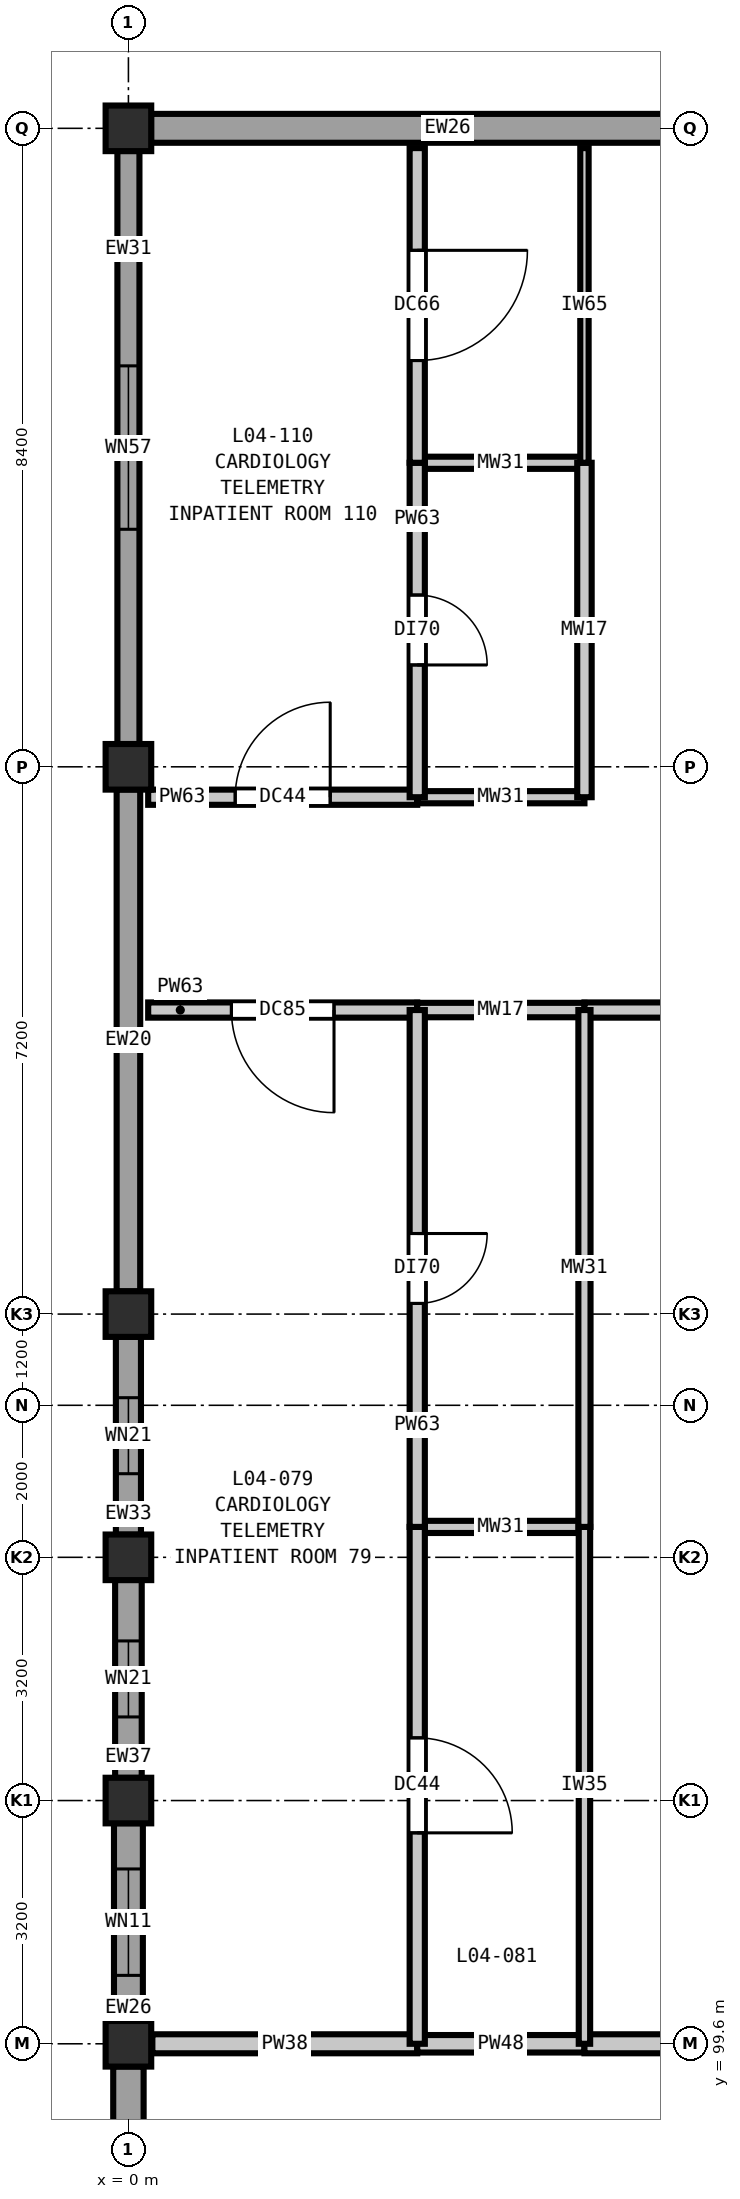
"""IFC4 building model, lengths in metres.
Left out: names, types, materials, properties, quantities, classifications, styles, units other than length and angle.
Written with IfcOpenShell. Run it as: python <this file> out.ifc"""

import sys

from ifc_helpers import new_model, si_unit, direction, frame, frame_2d, origin, origin_2d, place, context, subcontext, project, spatial, rectangle, extrude, element, fill, save


model = new_model("IFC4")
c1 = context("Model", 3, precision=1e-05, world=origin(), true_north=direction((0.0, 1.0)))
c2 = subcontext(c1, "Body", "Model", "MODEL_VIEW")
j1 = project(units=[si_unit("LENGTHUNIT", "METRE"), si_unit("PLANEANGLEUNIT", "RADIAN")], contexts=[c1])
p1 = place(None, origin())
s1 = spatial("IfcSite", under=j1, at=p1, CompositionType="ELEMENT")
p2 = place(p1, origin())
s2 = spatial("IfcBuilding", under=s1, at=p2, CompositionType="ELEMENT")
p3 = place(p2, frame((0.0, 0.0, 20.4)))
s3 = spatial("IfcBuildingStorey", under=s2, at=p3, CompositionType="ELEMENT", Elevation=20.4)
for number, where, z_axis, x_axis in (
    (1, (0.0, 99.6, 0.0), (0.0, 0.0, 1.0), (1.0, 0.0, 0.0)),
    (2, (0.0, 102.8, 0.0), (0.0, 0.0, 1.0), (1.0, 0.0, 0.0)),
    (3, (0.0, 106.0, 0.0), (0.0, 0.0, 1.0), (1.0, 0.0, 0.0)),
    (4, (0.0, 109.2, 0.0), (0.0, 0.0, 1.0), (1.0, 0.0, 0.0)),
    (5, (0.0, 116.4, 0.0), (0.0, 0.0, 1.0), (1.0, 0.0, 0.0)),
    (6, (0.0, 124.8, 0.0), (0.0, 0.0, 1.0), (1.0, 0.0, 0.0)),
):
    element("IfcColumn", number, at=place(p3, frame(where, z_axis=z_axis, x_axis=x_axis)), inside=s3, PredefinedType="COLUMN", context=c2, shape_type="SweptSolid", body=[
        extrude(rectangle(XDim=0.6, YDim=0.6, at=origin_2d()), origin(), (0.0, 0.0, 1.0), 4.2),
    ])
p4 = place(p3, frame((0.0, 91.498, 0.0), z_axis=(0.0, 0.0, 1.0), x_axis=(0.0, 1.0, 0.0)))
e7 = element("IfcWall", 7, at=p4, inside=s3, PredefinedType="SOLIDWALL", context=c2, shape_type="SweptSolid", body=[
    extrude(rectangle(XDim=7.804, YDim=0.4, at=frame_2d((3.902, 0.0))), origin(), (0.0, 0.0, 1.0), 3.48),
])
p5 = place(p4, frame((2.047, 0.0, 0.9)))
e8 = element("IfcOpeningElement", 8, at=p5, cuts=e7, PredefinedType="OPENING", context=c2, shape_type="SweptSolid", body=[
    extrude(rectangle(XDim=1.2, YDim=2.15, at=frame_2d((0.6, 1.075))), frame((0.0, 0.21, 0.0), z_axis=(0.0, -1.0, 0.0), x_axis=(1.0, 0.0, 0.0)), (0.0, 0.0, 1.0), 0.42),
])
p6 = place(p3, frame((0.0, 99.898, 0.0), z_axis=(0.0, 0.0, 1.0), x_axis=(0.0, 1.0, 0.0)))
e9 = element("IfcWall", 9, at=p6, inside=s3, PredefinedType="SOLIDWALL", context=c2, shape_type="SweptSolid", body=[
    extrude(rectangle(XDim=2.604, YDim=0.38, at=frame_2d((1.302, 0.0))), origin(), (0.0, 0.0, 1.0), 3.48),
])
p7 = place(p6, frame((0.602, 0.0, 0.9)))
e10 = element("IfcOpeningElement", 10, at=p7, cuts=e9, PredefinedType="OPENING", context=c2, shape_type="SweptSolid", body=[
    extrude(rectangle(XDim=1.4, YDim=2.15, at=frame_2d((0.7, 1.075))), frame((0.0, 0.2, 0.0), z_axis=(0.0, -1.0, 0.0), x_axis=(1.0, 0.0, 0.0)), (0.0, 0.0, 1.0), 0.4),
])
p8 = place(p3, frame((0.0, 103.098, 0.0), z_axis=(0.0, 0.0, 1.0), x_axis=(0.0, 1.0, 0.0)))
e11 = element("IfcWall", 11, at=p8, inside=s3, PredefinedType="SOLIDWALL", context=c2, shape_type="SweptSolid", body=[
    extrude(rectangle(XDim=2.604, YDim=0.35, at=frame_2d((1.302, 0.0))), origin(), (0.0, 0.0, 1.0), 3.48),
])
p9 = place(p8, frame((0.802, 0.0, 0.9)))
e12 = element("IfcOpeningElement", 12, at=p9, cuts=e11, PredefinedType="OPENING", context=c2, shape_type="SweptSolid", body=[
    extrude(rectangle(XDim=1.0, YDim=1.55, at=frame_2d((0.5, 0.775))), frame((0.0, 0.185, 0.0), z_axis=(0.0, -1.0, 0.0), x_axis=(1.0, 0.0, 0.0)), (0.0, 0.0, 1.0), 0.37),
])
p10 = place(p3, frame((0.0, 106.298, 0.0), z_axis=(0.0, 0.0, 1.0), x_axis=(0.0, 1.0, 0.0)))
e13 = element("IfcWall", 13, at=p10, inside=s3, PredefinedType="SOLIDWALL", context=c2, shape_type="SweptSolid", body=[
    extrude(rectangle(XDim=2.604, YDim=0.33, at=frame_2d((1.302, 0.0))), origin(), (0.0, 0.0, 1.0), 3.48),
])
p11 = place(p10, frame((0.802, 0.0, 0.9)))
e14 = element("IfcOpeningElement", 14, at=p11, cuts=e13, PredefinedType="OPENING", context=c2, shape_type="SweptSolid", body=[
    extrude(rectangle(XDim=1.0, YDim=1.55, at=frame_2d((0.5, 0.775))), frame((0.0, 0.175, 0.0), z_axis=(0.0, -1.0, 0.0), x_axis=(1.0, 0.0, 0.0)), (0.0, 0.0, 1.0), 0.35),
])
p12 = place(p3, frame((0.0, 109.498, 0.0), z_axis=(0.0, 0.0, 1.0), x_axis=(0.0, 1.0, 0.0)))
e15 = element("IfcWall", 15, at=p12, inside=s3, PredefinedType="SOLIDWALL", context=c2, shape_type="SweptSolid", body=[
    extrude(rectangle(XDim=6.604, YDim=0.31, at=frame_2d((3.302, 0.0))), origin(), (0.0, 0.0, 1.0), 3.48),
])
p13 = place(p3, frame((0.0, 116.698, 0.0), z_axis=(0.0, 0.0, 1.0), x_axis=(0.0, 1.0, 0.0)))
e16 = element("IfcWall", 16, at=p13, inside=s3, PredefinedType="SOLIDWALL", context=c2, shape_type="SweptSolid", body=[
    extrude(rectangle(XDim=7.804, YDim=0.29, at=frame_2d((3.902, 0.0))), origin(), (0.0, 0.0, 1.0), 3.48),
])
p14 = place(p13, frame((2.827, 0.0, 0.9)))
e17 = element("IfcOpeningElement", 17, at=p14, cuts=e16, PredefinedType="OPENING", context=c2, shape_type="SweptSolid", body=[
    extrude(rectangle(XDim=2.15, YDim=2.15, at=frame_2d((1.075, 1.075))), frame((0.0, 0.155, 0.0), z_axis=(0.0, -1.0, 0.0), x_axis=(1.0, 0.0, 0.0)), (0.0, 0.0, 1.0), 0.31),
])
p15 = place(p3, frame((0.298, 124.8, 0.0), z_axis=(0.0, 0.0, 1.0), x_axis=(1.0, 0.0, 0.0)))
e18 = element("IfcWall", 18, at=p15, inside=s3, PredefinedType="SOLIDWALL", context=c2, shape_type="SweptSolid", body=[
    extrude(rectangle(XDim=7.804, YDim=0.38, at=frame_2d((3.902, 0.0))), origin(), (0.0, 0.0, 1.0), 3.48),
])
p16 = place(p3, frame((0.315, 99.6, 0.0), z_axis=(0.0, 0.0, 1.0), x_axis=(1.0, 0.0, 0.0)))
e19 = element("IfcWall", 19, at=p16, inside=s3, PredefinedType="PARTITIONING", context=c2, shape_type="SweptSolid", body=[
    extrude(rectangle(XDim=3.485, YDim=0.25, at=frame_2d((1.743, 0.0))), origin(), (0.0, 0.0, 1.0), 3.585),
])
p17 = place(p3, frame((3.8, 99.6, 0.0), z_axis=(0.0, 0.0, 1.0), x_axis=(1.0, 0.0, 0.0)))
e20 = element("IfcWall", 20, at=p17, inside=s3, PredefinedType="PARTITIONING", context=c2, shape_type="SweptSolid", body=[
    extrude(rectangle(XDim=2.2, YDim=0.23, at=frame_2d((1.1, 0.0))), origin(), (0.0, 0.0, 1.0), 3.585),
])
p18 = place(p3, frame((6.0, 99.6, 0.0), z_axis=(0.0, 0.0, 1.0), x_axis=(1.0, 0.0, 0.0)))
e21 = element("IfcWall", 21, at=p18, inside=s3, PredefinedType="PARTITIONING", context=c2, shape_type="SweptSolid", body=[
    extrude(rectangle(XDim=2.085, YDim=0.25, at=frame_2d((1.042, 0.0))), origin(), (0.0, 0.0, 1.0), 3.585),
])
p19 = place(p3, frame((3.8, 106.4, 0.0), z_axis=(0.0, 0.0, 1.0), x_axis=(1.0, 0.0, 0.0)))
e22 = element("IfcWall", 22, at=p19, inside=s3, PredefinedType="PLUMBINGWALL", context=c2, shape_type="SweptSolid", body=[
    extrude(rectangle(XDim=2.2, YDim=0.16, at=frame_2d((1.1, 0.0))), origin(), (0.0, 0.0, 1.0), 3.82),
])
p20 = place(p3, frame((0.26, 113.2, 0.0), z_axis=(0.0, 0.0, 1.0), x_axis=(1.0, 0.0, 0.0)))
e23 = element("IfcWall", 23, at=p20, inside=s3, PredefinedType="PARTITIONING", context=c2, shape_type="SweptSolid", body=[
    extrude(rectangle(XDim=3.54, YDim=0.2, at=frame_2d((1.77, 0.0))), origin(), (0.0, 0.0, 1.0), 3.82),
])
p21 = place(p20, frame((1.095, 0.0, 0.0)))
e24 = element("IfcOpeningElement", 24, at=p21, cuts=e23, PredefinedType="OPENING", context=c2, shape_type="SweptSolid", body=[
    extrude(rectangle(XDim=1.35, YDim=2.2, at=frame_2d((0.675, 1.1))), frame((0.0, 0.11, 0.0), z_axis=(0.0, -1.0, 0.0), x_axis=(1.0, 0.0, 0.0)), (0.0, 0.0, 1.0), 0.22),
])
p22 = place(p3, frame((3.8, 113.2, 0.0), z_axis=(0.0, 0.0, 1.0), x_axis=(1.0, 0.0, 0.0)))
e25 = element("IfcWall", 25, at=p22, inside=s3, PredefinedType="PLUMBINGWALL", context=c2, shape_type="SweptSolid", body=[
    extrude(rectangle(XDim=2.2, YDim=0.19, at=frame_2d((1.1, 0.0))), origin(), (0.0, 0.0, 1.0), 3.82),
])
p23 = place(p3, frame((6.0, 113.2, 0.0), z_axis=(0.0, 0.0, 1.0), x_axis=(1.0, 0.0, 0.0)))
e26 = element("IfcWall", 26, at=p23, inside=s3, PredefinedType="PARTITIONING", context=c2, shape_type="SweptSolid", body=[
    extrude(rectangle(XDim=7.0, YDim=0.2, at=frame_2d((3.5, 0.0))), origin(), (0.0, 0.0, 1.0), 3.82),
])
p24 = place(p23, frame((2.775, 0.0, 0.0)))
e27 = element("IfcOpeningElement", 27, at=p24, cuts=e26, PredefinedType="OPENING", context=c2, shape_type="SweptSolid", body=[
    extrude(rectangle(XDim=1.45, YDim=2.25, at=frame_2d((0.725, 1.125))), frame((0.0, 0.11, 0.0), z_axis=(0.0, -1.0, 0.0), x_axis=(1.0, 0.0, 0.0)), (0.0, 0.0, 1.0), 0.22),
])
p25 = place(p3, frame((0.26, 116.0, 0.0), z_axis=(0.0, 0.0, 1.0), x_axis=(1.0, 0.0, 0.0)))
e28 = element("IfcWall", 28, at=p25, inside=s3, PredefinedType="PARTITIONING", context=c2, shape_type="SweptSolid", body=[
    extrude(rectangle(XDim=3.54, YDim=0.2, at=frame_2d((1.77, 0.0))), origin(), (0.0, 0.0, 1.0), 3.82),
])
p26 = place(p25, frame((1.145, 0.0, 0.0)))
e29 = element("IfcOpeningElement", 29, at=p26, cuts=e28, PredefinedType="OPENING", context=c2, shape_type="SweptSolid", body=[
    extrude(rectangle(XDim=1.25, YDim=2.15, at=frame_2d((0.625, 1.075))), frame((0.0, 0.11, 0.0), z_axis=(0.0, -1.0, 0.0), x_axis=(1.0, 0.0, 0.0)), (0.0, 0.0, 1.0), 0.22),
])
for number, where, z_axis, x_axis in (
    (30, (3.8, 116.0, 0.0), (0.0, 0.0, 1.0), (1.0, 0.0, 0.0)),
    (31, (3.8, 120.4, 0.0), (0.0, 0.0, 1.0), (1.0, 0.0, 0.0)),
):
    element("IfcWall", number, at=place(p3, frame(where, z_axis=z_axis, x_axis=x_axis)), inside=s3, PredefinedType="PLUMBINGWALL", context=c2, shape_type="SweptSolid", body=[
        extrude(rectangle(XDim=2.2, YDim=0.16, at=frame_2d((1.1, 0.0))), origin(), (0.0, 0.0, 1.0), 3.82),
    ])
p27 = place(p3, frame((3.8, 99.6, 0.0), z_axis=(0.0, 0.0, 1.0), x_axis=(0.0, 1.0, 0.0)))
e32 = element("IfcWall", 32, at=p27, inside=s3, PredefinedType="PARTITIONING", context=c2, shape_type="SweptSolid", body=[
    extrude(rectangle(XDim=6.8, YDim=0.2, at=frame_2d((3.4, 0.0))), origin(), (0.0, 0.0, 1.0), 3.82),
])
p28 = place(p27, frame((2.775, 0.0, 0.0)))
e33 = element("IfcOpeningElement", 33, at=p28, cuts=e32, PredefinedType="OPENING", context=c2, shape_type="SweptSolid", body=[
    extrude(rectangle(XDim=1.25, YDim=2.15, at=frame_2d((0.625, 1.075))), frame((0.0, 0.11, 0.0), z_axis=(0.0, -1.0, 0.0), x_axis=(1.0, 0.0, 0.0)), (0.0, 0.0, 1.0), 0.22),
])
p29 = place(p3, frame((3.8, 106.4, 0.0), z_axis=(0.0, 0.0, 1.0), x_axis=(0.0, 1.0, 0.0)))
e34 = element("IfcWall", 34, at=p29, inside=s3, PredefinedType="PARTITIONING", context=c2, shape_type="SweptSolid", body=[
    extrude(rectangle(XDim=6.8, YDim=0.2, at=frame_2d((3.4, 0.0))), origin(), (0.0, 0.0, 1.0), 3.82),
])
p30 = place(p29, frame((2.94, 0.0, 0.0)))
e35 = element("IfcOpeningElement", 35, at=p30, cuts=e34, PredefinedType="OPENING", context=c2, shape_type="SweptSolid", body=[
    extrude(rectangle(XDim=0.92, YDim=2.1, at=frame_2d((0.46, 1.05))), frame((0.0, 0.11, 0.0), z_axis=(0.0, -1.0, 0.0), x_axis=(1.0, 0.0, 0.0)), (0.0, 0.0, 1.0), 0.22),
])
p31 = place(p3, frame((3.8, 116.0, 0.0), z_axis=(0.0, 0.0, 1.0), x_axis=(0.0, 1.0, 0.0)))
e36 = element("IfcWall", 36, at=p31, inside=s3, PredefinedType="PARTITIONING", context=c2, shape_type="SweptSolid", body=[
    extrude(rectangle(XDim=4.4, YDim=0.2, at=frame_2d((2.2, 0.0))), origin(), (0.0, 0.0, 1.0), 3.82),
])
p32 = place(p31, frame((1.74, 0.0, 0.0)))
e37 = element("IfcOpeningElement", 37, at=p32, cuts=e36, PredefinedType="OPENING", context=c2, shape_type="SweptSolid", body=[
    extrude(rectangle(XDim=0.92, YDim=2.1, at=frame_2d((0.46, 1.05))), frame((0.0, 0.11, 0.0), z_axis=(0.0, -1.0, 0.0), x_axis=(1.0, 0.0, 0.0)), (0.0, 0.0, 1.0), 0.22),
])
p33 = place(p3, frame((3.8, 120.4, 0.0), z_axis=(0.0, 0.0, 1.0), x_axis=(0.0, 1.0, 0.0)))
e38 = element("IfcWall", 38, at=p33, inside=s3, PredefinedType="PARTITIONING", context=c2, shape_type="SweptSolid", body=[
    extrude(rectangle(XDim=4.14, YDim=0.2, at=frame_2d((2.07, 0.0))), origin(), (0.0, 0.0, 1.0), 3.82),
])
p34 = place(p33, frame((1.345, 0.0, 0.0)))
e39 = element("IfcOpeningElement", 39, at=p34, cuts=e38, PredefinedType="OPENING", context=c2, shape_type="SweptSolid", body=[
    extrude(rectangle(XDim=1.45, YDim=2.25, at=frame_2d((0.725, 1.125))), frame((0.0, 0.11, 0.0), z_axis=(0.0, -1.0, 0.0), x_axis=(1.0, 0.0, 0.0)), (0.0, 0.0, 1.0), 0.22),
])
p35 = place(p3, frame((6.0, 99.6, 0.0), z_axis=(0.0, 0.0, 1.0), x_axis=(0.0, 1.0, 0.0)))
e40 = element("IfcWall", 40, at=p35, inside=s3, PredefinedType="PARTITIONING", context=c2, shape_type="SweptSolid", body=[
    extrude(rectangle(XDim=6.8, YDim=0.15, at=frame_2d((3.4, 0.0))), origin(), (0.0, 0.0, 1.0), 3.82),
])
p36 = place(p3, frame((6.0, 106.4, 0.0), z_axis=(0.0, 0.0, 1.0), x_axis=(0.0, 1.0, 0.0)))
e41 = element("IfcWall", 41, at=p36, inside=s3, PredefinedType="PLUMBINGWALL", context=c2, shape_type="SweptSolid", body=[
    extrude(rectangle(XDim=6.8, YDim=0.16, at=frame_2d((3.4, 0.0))), origin(), (0.0, 0.0, 1.0), 3.82),
])
p37 = place(p3, frame((6.0, 116.0, 0.0), z_axis=(0.0, 0.0, 1.0), x_axis=(0.0, 1.0, 0.0)))
e42 = element("IfcWall", 42, at=p37, inside=s3, PredefinedType="PLUMBINGWALL", context=c2, shape_type="SweptSolid", body=[
    extrude(rectangle(XDim=4.4, YDim=0.19, at=frame_2d((2.2, 0.0))), origin(), (0.0, 0.0, 1.0), 3.82),
])
p38 = place(p3, frame((6.0, 120.4, 0.0), z_axis=(0.0, 0.0, 1.0), x_axis=(0.0, 1.0, 0.0)))
e43 = element("IfcWall", 43, at=p38, inside=s3, PredefinedType="PARTITIONING", context=c2, shape_type="SweptSolid", body=[
    extrude(rectangle(XDim=4.14, YDim=0.11, at=frame_2d((2.07, 0.0))), origin(), (0.0, 0.0, 1.0), 3.82),
])
p39 = place(p7, origin())
e44 = element("IfcWindow", 44, at=p39, inside=s3, PartitioningType="SINGLE_PANEL", PredefinedType="WINDOW", context=c2, shape_type="SweptSolid", body=[
    extrude(rectangle(XDim=1.4, YDim=2.15, at=frame_2d((0.7, 1.075))), frame((0.0, 0.03, 0.0), z_axis=(0.0, -1.0, 0.0), x_axis=(1.0, 0.0, 0.0)), (0.0, 0.0, 1.0), 0.06),
])
fill(e10, e44)
p40 = place(p9, origin())
e45 = element("IfcWindow", 45, at=p40, inside=s3, PartitioningType="SINGLE_PANEL", PredefinedType="WINDOW", context=c2, shape_type="SweptSolid", body=[
    extrude(rectangle(XDim=1.0, YDim=1.55, at=frame_2d((0.5, 0.775))), frame((0.0, 0.03, 0.0), z_axis=(0.0, -1.0, 0.0), x_axis=(1.0, 0.0, 0.0)), (0.0, 0.0, 1.0), 0.06),
])
fill(e12, e45)
p41 = place(p11, origin())
e46 = element("IfcWindow", 46, at=p41, inside=s3, PartitioningType="SINGLE_PANEL", PredefinedType="WINDOW", context=c2, shape_type="SweptSolid", body=[
    extrude(rectangle(XDim=1.0, YDim=1.55, at=frame_2d((0.5, 0.775))), frame((0.0, 0.03, 0.0), z_axis=(0.0, -1.0, 0.0), x_axis=(1.0, 0.0, 0.0)), (0.0, 0.0, 1.0), 0.06),
])
fill(e14, e46)
p42 = place(p14, origin())
e47 = element("IfcWindow", 47, at=p42, inside=s3, PartitioningType="DOUBLE_PANEL_VERTICAL", PredefinedType="WINDOW", context=c2, shape_type="SweptSolid", body=[
    extrude(rectangle(XDim=2.15, YDim=2.15, at=frame_2d((1.075, 1.075))), frame((0.0, 0.03, 0.0), z_axis=(0.0, -1.0, 0.0), x_axis=(1.0, 0.0, 0.0)), (0.0, 0.0, 1.0), 0.06),
])
fill(e17, e47)
p43 = place(p21, frame((1.35, 0.0, 0.0), z_axis=(0.0, 0.0, 1.0), x_axis=(-1.0, 0.0, 0.0)))
e48 = element("IfcDoor", 48, at=p43, inside=s3, OperationType="SINGLE_SWING_LEFT", PredefinedType="DOOR", context=c2, shape_type="SweptSolid", body=[
    extrude(rectangle(XDim=1.35, YDim=2.2, at=frame_2d((0.675, 1.1))), frame((0.0, 0.025, 0.0), z_axis=(0.0, -1.0, 0.0), x_axis=(1.0, 0.0, 0.0)), (0.0, 0.0, 1.0), 0.05),
])
fill(e24, e48)
p44 = place(p26, origin())
e49 = element("IfcDoor", 49, at=p44, inside=s3, OperationType="SINGLE_SWING_RIGHT", PredefinedType="DOOR", context=c2, shape_type="SweptSolid", body=[
    extrude(rectangle(XDim=1.25, YDim=2.15, at=frame_2d((0.625, 1.075))), frame((0.0, 0.025, 0.0), z_axis=(0.0, -1.0, 0.0), x_axis=(1.0, 0.0, 0.0)), (0.0, 0.0, 1.0), 0.05),
])
fill(e29, e49)
p45 = place(p28, frame((1.25, 0.0, 0.0), z_axis=(0.0, 0.0, 1.0), x_axis=(-1.0, 0.0, 0.0)))
e50 = element("IfcDoor", 50, at=p45, inside=s3, OperationType="SINGLE_SWING_RIGHT", PredefinedType="DOOR", context=c2, shape_type="SweptSolid", body=[
    extrude(rectangle(XDim=1.25, YDim=2.15, at=frame_2d((0.625, 1.075))), frame((0.0, 0.025, 0.0), z_axis=(0.0, -1.0, 0.0), x_axis=(1.0, 0.0, 0.0)), (0.0, 0.0, 1.0), 0.05),
])
fill(e33, e50)
p46 = place(p30, frame((0.92, 0.0, 0.0), z_axis=(0.0, 0.0, 1.0), x_axis=(-1.0, 0.0, 0.0)))
e51 = element("IfcDoor", 51, at=p46, inside=s3, OperationType="SINGLE_SWING_LEFT", PredefinedType="DOOR", context=c2, shape_type="SweptSolid", body=[
    extrude(rectangle(XDim=0.92, YDim=2.1, at=frame_2d((0.46, 1.05))), frame((0.0, 0.025, 0.0), z_axis=(0.0, -1.0, 0.0), x_axis=(1.0, 0.0, 0.0)), (0.0, 0.0, 1.0), 0.05),
])
fill(e35, e51)
p47 = place(p32, frame((0.92, 0.0, 0.0), z_axis=(0.0, 0.0, 1.0), x_axis=(-1.0, 0.0, 0.0)))
e52 = element("IfcDoor", 52, at=p47, inside=s3, OperationType="SINGLE_SWING_RIGHT", PredefinedType="DOOR", context=c2, shape_type="SweptSolid", body=[
    extrude(rectangle(XDim=0.92, YDim=2.1, at=frame_2d((0.46, 1.05))), frame((0.0, 0.025, 0.0), z_axis=(0.0, -1.0, 0.0), x_axis=(1.0, 0.0, 0.0)), (0.0, 0.0, 1.0), 0.05),
])
fill(e37, e52)
p48 = place(p34, frame((1.45, 0.0, 0.0), z_axis=(0.0, 0.0, 1.0), x_axis=(-1.0, 0.0, 0.0)))
e53 = element("IfcDoor", 53, at=p48, inside=s3, OperationType="SINGLE_SWING_LEFT", PredefinedType="DOOR", context=c2, shape_type="SweptSolid", body=[
    extrude(rectangle(XDim=1.45, YDim=2.25, at=frame_2d((0.725, 1.125))), frame((0.0, 0.025, 0.0), z_axis=(0.0, -1.0, 0.0), x_axis=(1.0, 0.0, 0.0)), (0.0, 0.0, 1.0), 0.05),
])
fill(e39, e53)
save(model, sys.argv[1])
